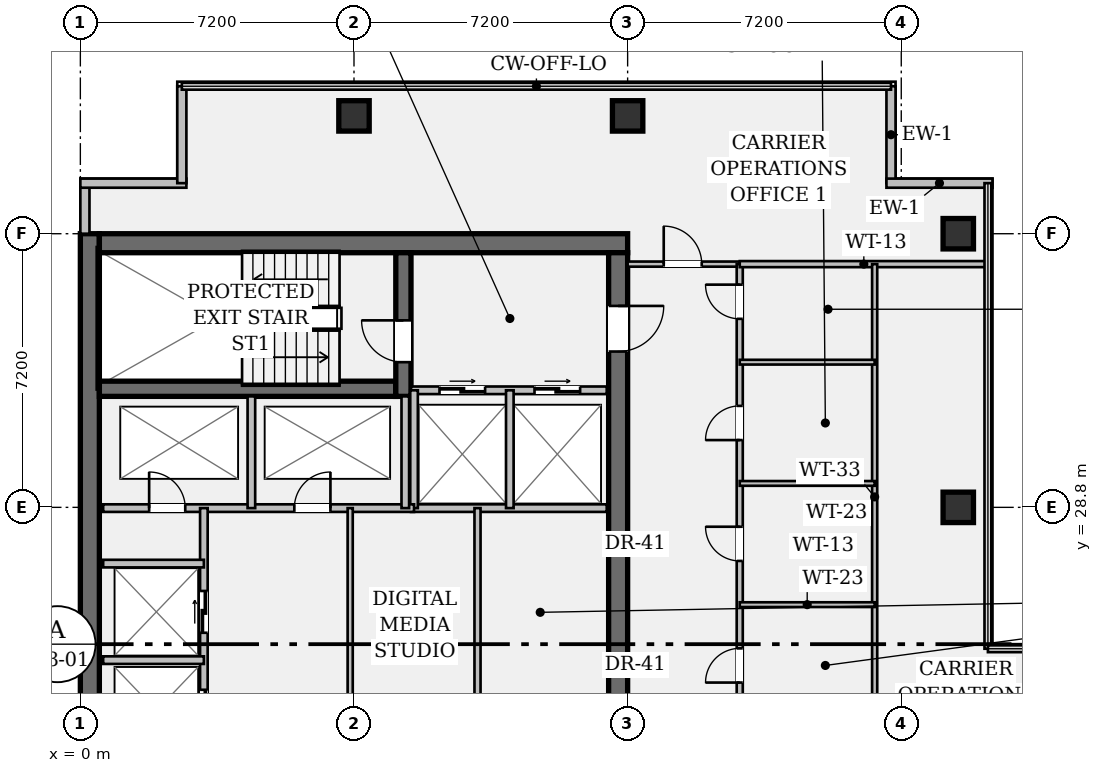
"""IFC4 building model, lengths in metres.
Left out: names, types, materials, properties, quantities, classifications, styles, units other than length and angle.
Written with IfcOpenShell. Run it as: python <this file> out.ifc"""

import sys

from ifc_helpers import new_model, si_unit, direction, frame, frame_2d, origin, origin_2d, place, context, subcontext, project, spatial, rectangle, hollow_rectangle, extrude, element, fill, save


model = new_model("IFC4")
c1 = context("Model", 3, precision=1e-05, world=origin(), true_north=direction((0.0, 1.0)))
c2 = subcontext(c1, "Body", "Model", "MODEL_VIEW")
j1 = project(units=[si_unit("LENGTHUNIT", "METRE"), si_unit("PLANEANGLEUNIT", "RADIAN")], contexts=[c1])
p1 = place(None, origin())
s1 = spatial("IfcSite", under=j1, at=p1, CompositionType="ELEMENT")
p2 = place(p1, origin())
s2 = spatial("IfcBuilding", under=s1, at=p2, CompositionType="ELEMENT")
p3 = place(p2, frame((0.0, 0.0, 194.25)))
s3 = spatial("IfcBuildingStorey", under=s2, at=p3, CompositionType="ELEMENT", Elevation=194.25)
p4 = place(p3, frame((0.25, 7.2, 0.0), z_axis=(0.0, 0.0, 1.0), x_axis=(0.0, 1.0, 0.0)))
e1 = element("IfcWall", 1, at=p4, inside=s3, PredefinedType="SHEAR", context=c2, shape_type="SweptSolid", body=[
    extrude(rectangle(XDim=28.8, YDim=0.5, at=frame_2d((14.4, 0.0))), origin(), (0.0, 0.0, 1.0), 3.24),
])
p5 = place(p3, frame((0.5, 35.75, 0.0), z_axis=(0.0, 0.0, 1.0), x_axis=(1.0, 0.0, 0.0)))
e2 = element("IfcWall", 2, at=p5, inside=s3, PredefinedType="SHEAR", context=c2, shape_type="SweptSolid", body=[
    extrude(rectangle(XDim=13.9, YDim=0.5, at=frame_2d((6.95, 0.0))), origin(), (0.0, 0.0, 1.0), 3.24),
])
p6 = place(p3, frame((14.15, 35.5, 0.0), z_axis=(0.0, 0.0, 1.0), x_axis=(0.0, -1.0, 0.0)))
e3 = element("IfcWall", 3, at=p6, inside=s3, PredefinedType="SHEAR", context=c2, shape_type="SweptSolid", body=[
    extrude(rectangle(XDim=27.8, YDim=0.5, at=frame_2d((13.9, 0.0))), origin(), (0.0, 0.0, 1.0), 3.24),
])
p7 = place(p6, frame((1.4, 0.0, 0.0)))
e4 = element("IfcOpeningElement", 4, at=p7, cuts=e3, PredefinedType="OPENING", context=c2, shape_type="SweptSolid", body=[
    extrude(rectangle(XDim=1.2, YDim=2.15, at=frame_2d((0.6, 1.075))), frame((0.0, 0.262, 0.0), z_axis=(0.0, -1.0, 0.0), x_axis=(1.0, 0.0, 0.0)), (0.0, 0.0, 1.0), 0.524),
])
p8 = place(p6, frame((25.35, 0.0, 0.0)))
e5 = element("IfcOpeningElement", 5, at=p8, cuts=e3, PredefinedType="OPENING", context=c2, shape_type="SweptSolid", body=[
    extrude(rectangle(XDim=1.2, YDim=2.15, at=frame_2d((0.6, 1.075))), frame((0.0, 0.262, 0.0), z_axis=(0.0, -1.0, 0.0), x_axis=(1.0, 0.0, 0.0)), (0.0, 0.0, 1.0), 0.524),
])
p9 = place(p6, frame((14.7, 0.0, 0.0)))
e6 = element("IfcOpeningElement", 6, at=p9, cuts=e3, PredefinedType="OPENING", context=c2, shape_type="SweptSolid", body=[
    extrude(rectangle(XDim=1.6, YDim=2.2, at=frame_2d((0.8, 1.1))), frame((0.0, 0.262, 0.0), z_axis=(0.0, -1.0, 0.0), x_axis=(1.0, 0.0, 0.0)), (0.0, 0.0, 1.0), 0.524),
])
p10 = place(p3, frame((0.5, 31.92, 0.0), z_axis=(0.0, 0.0, 1.0), x_axis=(1.0, 0.0, 0.0)))
e7 = element("IfcWall", 7, at=p10, inside=s3, PredefinedType="SHEAR", context=c2, shape_type="SweptSolid", body=[
    extrude(rectangle(XDim=7.8, YDim=0.4, at=frame_2d((3.9, 0.0))), origin(), (0.0, 0.0, 1.0), 3.24),
])
p11 = place(p3, frame((8.5, 31.72, 0.0), z_axis=(0.0, 0.0, 1.0), x_axis=(0.0, 1.0, 0.0)))
e8 = element("IfcWall", 8, at=p11, inside=s3, PredefinedType="SHEAR", context=c2, shape_type="SweptSolid", body=[
    extrude(rectangle(XDim=3.78, YDim=0.4, at=frame_2d((1.89, 0.0))), origin(), (0.0, 0.0, 1.0), 3.24),
])
p12 = place(p11, frame((0.9, 0.0, 0.0)))
e9 = element("IfcOpeningElement", 9, at=p12, cuts=e8, PredefinedType="OPENING", context=c2, shape_type="SweptSolid", body=[
    extrude(rectangle(XDim=1.1, YDim=2.15, at=frame_2d((0.55, 1.075))), frame((0.0, 0.212, 0.0), z_axis=(0.0, -1.0, 0.0), x_axis=(1.0, 0.0, 0.0)), (0.0, 0.0, 1.0), 0.424),
])
for number, where, z_axis, x_axis in (
    (10, (7.2, 39.1, 0.0), (0.0, 0.0, 1.0), (1.0, 0.0, 0.0)),
    (11, (14.4, 39.1, 0.0), (0.0, 0.0, 1.0), (1.0, 0.0, 0.0)),
    (12, (23.1, 28.8, 0.0), (0.0, 0.0, 1.0), (1.0, 0.0, 0.0)),
    (13, (23.1, 36.0, 0.0), (0.0, 0.0, 1.0), (1.0, 0.0, 0.0)),
):
    element("IfcColumn", number, at=place(p3, frame(where, z_axis=z_axis, x_axis=x_axis)), inside=s3, PredefinedType="COLUMN", context=c2, shape_type="SweptSolid", body=[
        extrude(hollow_rectangle(XDim=0.8, YDim=0.8, WallThickness=0.05, at=origin_2d()), origin(), (0.0, 0.0, 1.0), 3.24),
    ])
p13 = place(p3, frame((0.12, 36.0, 0.0), z_axis=(0.0, 0.0, 1.0), x_axis=(0.0, 1.0, 0.0)))
e14 = element("IfcWall", 14, at=p13, inside=s3, PredefinedType="STANDARD", context=c2, shape_type="SweptSolid", body=[
    extrude(rectangle(XDim=1.33, YDim=0.24, at=frame_2d((0.665, 0.0))), origin(), (0.0, 0.0, 1.0), 3.24),
])
p14 = place(p3, frame((0.0, 37.33, 0.0), z_axis=(0.0, 0.0, 1.0), x_axis=(1.0, 0.0, 0.0)))
e15 = element("IfcWall", 15, at=p14, inside=s3, PredefinedType="STANDARD", context=c2, shape_type="SweptSolid", body=[
    extrude(rectangle(XDim=2.79, YDim=0.24, at=frame_2d((1.395, 0.0))), origin(), (0.0, 0.0, 1.0), 3.24),
])
for number, where, z_axis, x_axis in (
    (16, (2.67, 37.33, 0.0), (0.0, 0.0, 1.0), (0.0, 1.0, 0.0)),
    (17, (21.33, 39.88, 0.0), (0.0, 0.0, 1.0), (0.0, -1.0, 0.0)),
):
    element("IfcWall", number, at=place(p3, frame(where, z_axis=z_axis, x_axis=x_axis)), inside=s3, PredefinedType="STANDARD", context=c2, shape_type="SweptSolid", body=[
        extrude(rectangle(XDim=2.55, YDim=0.24, at=frame_2d((1.275, 0.0))), origin(), (0.0, 0.0, 1.0), 3.24),
    ])
p15 = place(p3, frame((21.21, 37.33, 0.0), z_axis=(0.0, 0.0, 1.0), x_axis=(1.0, 0.0, 0.0)))
e18 = element("IfcWall", 18, at=p15, inside=s3, PredefinedType="STANDARD", context=c2, shape_type="SweptSolid", body=[
    extrude(rectangle(XDim=2.79, YDim=0.24, at=frame_2d((1.395, 0.0))), origin(), (0.0, 0.0, 1.0), 3.24),
])
p16 = place(p3, frame((8.7, 31.88, 0.0), z_axis=(0.0, 0.0, 1.0), x_axis=(1.0, 0.0, 0.0)))
e19 = element("IfcWall", 19, at=p16, inside=s3, PredefinedType="PARTITIONING", context=c2, shape_type="SweptSolid", body=[
    extrude(rectangle(XDim=5.15, YDim=0.2, at=frame_2d((2.575, 0.0))), origin(), (0.0, 0.0, 1.0), 3.24),
])
p17 = place(p16, frame((0.75, 0.0, 0.0)))
e20 = element("IfcOpeningElement", 20, at=p17, cuts=e19, PredefinedType="OPENING", context=c2, shape_type="SweptSolid", body=[
    extrude(rectangle(XDim=1.2, YDim=2.2, at=frame_2d((0.6, 1.1))), frame((0.0, 0.112, 0.0), z_axis=(0.0, -1.0, 0.0), x_axis=(1.0, 0.0, 0.0)), (0.0, 0.0, 1.0), 0.224),
])
p18 = place(p16, frame((3.25, 0.0, 0.0)))
e21 = element("IfcOpeningElement", 21, at=p18, cuts=e19, PredefinedType="OPENING", context=c2, shape_type="SweptSolid", body=[
    extrude(rectangle(XDim=1.2, YDim=2.2, at=frame_2d((0.6, 1.1))), frame((0.0, 0.112, 0.0), z_axis=(0.0, -1.0, 0.0), x_axis=(1.0, 0.0, 0.0)), (0.0, 0.0, 1.0), 0.224),
])
p19 = place(p3, frame((8.7, 28.78, 0.0), z_axis=(0.0, 0.0, 1.0), x_axis=(1.0, 0.0, 0.0)))
e22 = element("IfcWall", 22, at=p19, inside=s3, PredefinedType="PARTITIONING", context=c2, shape_type="SweptSolid", body=[
    extrude(rectangle(XDim=5.15, YDim=0.2, at=frame_2d((2.575, 0.0))), origin(), (0.0, 0.0, 1.0), 3.24),
])
for number, where, z_axis, x_axis in (
    (23, (8.78, 28.78, 0.0), (0.0, 0.0, 1.0), (0.0, 1.0, 0.0)),
    (24, (11.3, 28.78, 0.0), (0.0, 0.0, 1.0), (0.0, 1.0, 0.0)),
):
    element("IfcWall", number, at=place(p3, frame(where, z_axis=z_axis, x_axis=x_axis)), inside=s3, PredefinedType="PARTITIONING", context=c2, shape_type="SweptSolid", body=[
        extrude(rectangle(XDim=3.1, YDim=0.2, at=frame_2d((1.55, 0.0))), origin(), (0.0, 0.0, 1.0), 3.24),
    ])
p20 = place(p3, frame((0.6, 28.78, 0.0), z_axis=(0.0, 0.0, 1.0), x_axis=(1.0, 0.0, 0.0)))
e25 = element("IfcWall", 25, at=p20, inside=s3, PredefinedType="PARTITIONING", context=c2, shape_type="SweptSolid", body=[
    extrude(rectangle(XDim=8.18, YDim=0.2, at=frame_2d((4.09, 0.0))), origin(), (0.0, 0.0, 1.0), 3.24),
])
p21 = place(p20, frame((1.21, 0.0, 0.0)))
e26 = element("IfcOpeningElement", 26, at=p21, cuts=e25, PredefinedType="OPENING", context=c2, shape_type="SweptSolid", body=[
    extrude(rectangle(XDim=0.95, YDim=2.15, at=frame_2d((0.475, 1.075))), frame((0.0, 0.112, 0.0), z_axis=(0.0, -1.0, 0.0), x_axis=(1.0, 0.0, 0.0)), (0.0, 0.0, 1.0), 0.224),
])
p22 = place(p20, frame((5.03, 0.0, 0.0)))
e27 = element("IfcOpeningElement", 27, at=p22, cuts=e25, PredefinedType="OPENING", context=c2, shape_type="SweptSolid", body=[
    extrude(rectangle(XDim=0.95, YDim=2.15, at=frame_2d((0.475, 1.075))), frame((0.0, 0.112, 0.0), z_axis=(0.0, -1.0, 0.0), x_axis=(1.0, 0.0, 0.0)), (0.0, 0.0, 1.0), 0.224),
])
for number, where, z_axis, x_axis in (
    (28, (4.5, 28.78, 0.0), (0.0, 0.0, 1.0), (0.0, 1.0, 0.0)),
    (29, (8.55, 28.78, 0.0), (0.0, 0.0, 1.0), (0.0, 1.0, 0.0)),
):
    element("IfcWall", number, at=place(p3, frame(where, z_axis=z_axis, x_axis=x_axis)), inside=s3, PredefinedType="PARTITIONING", context=c2, shape_type="SweptSolid", body=[
        extrude(rectangle(XDim=2.94, YDim=0.2, at=frame_2d((1.47, 0.0))), origin(), (0.0, 0.0, 1.0), 3.24),
    ])
p23 = place(p3, frame((3.25, 15.7, 0.0), z_axis=(0.0, 0.0, 1.0), x_axis=(0.0, 1.0, 0.0)))
e30 = element("IfcWall", 30, at=p23, inside=s3, PredefinedType="PARTITIONING", context=c2, shape_type="SweptSolid", body=[
    extrude(rectangle(XDim=13.08, YDim=0.2, at=frame_2d((6.54, 0.0))), origin(), (0.0, 0.0, 1.0), 3.24),
])
p24 = place(p23, frame((0.9, 0.0, 0.0)))
e31 = element("IfcOpeningElement", 31, at=p24, cuts=e30, PredefinedType="OPENING", context=c2, shape_type="SweptSolid", body=[
    extrude(rectangle(XDim=1.1, YDim=2.2, at=frame_2d((0.55, 1.1))), frame((0.0, 0.112, 0.0), z_axis=(0.0, -1.0, 0.0), x_axis=(1.0, 0.0, 0.0)), (0.0, 0.0, 1.0), 0.224),
])
p25 = place(p23, frame((3.5, 0.0, 0.0)))
e32 = element("IfcOpeningElement", 32, at=p25, cuts=e30, PredefinedType="OPENING", context=c2, shape_type="SweptSolid", body=[
    extrude(rectangle(XDim=1.1, YDim=2.2, at=frame_2d((0.55, 1.1))), frame((0.0, 0.112, 0.0), z_axis=(0.0, -1.0, 0.0), x_axis=(1.0, 0.0, 0.0)), (0.0, 0.0, 1.0), 0.224),
])
p26 = place(p23, frame((7.2, 0.0, 0.0)))
e33 = element("IfcOpeningElement", 33, at=p26, cuts=e30, PredefinedType="OPENING", context=c2, shape_type="SweptSolid", body=[
    extrude(rectangle(XDim=1.1, YDim=2.2, at=frame_2d((0.55, 1.1))), frame((0.0, 0.112, 0.0), z_axis=(0.0, -1.0, 0.0), x_axis=(1.0, 0.0, 0.0)), (0.0, 0.0, 1.0), 0.224),
])
p27 = place(p23, frame((9.8, 0.0, 0.0)))
e34 = element("IfcOpeningElement", 34, at=p27, cuts=e30, PredefinedType="OPENING", context=c2, shape_type="SweptSolid", body=[
    extrude(rectangle(XDim=1.1, YDim=2.2, at=frame_2d((0.55, 1.1))), frame((0.0, 0.112, 0.0), z_axis=(0.0, -1.0, 0.0), x_axis=(1.0, 0.0, 0.0)), (0.0, 0.0, 1.0), 0.224),
])
for number, where, z_axis, x_axis in (
    (35, (0.6, 24.78, 0.0), (0.0, 0.0, 1.0), (1.0, 0.0, 0.0)),
    (36, (0.6, 27.32, 0.0), (0.0, 0.0, 1.0), (1.0, 0.0, 0.0)),
):
    element("IfcWall", number, at=place(p3, frame(where, z_axis=z_axis, x_axis=x_axis)), inside=s3, PredefinedType="PARTITIONING", context=c2, shape_type="SweptSolid", body=[
        extrude(rectangle(XDim=2.65, YDim=0.2, at=frame_2d((1.325, 0.0))), origin(), (0.0, 0.0, 1.0), 3.24),
    ])
p28 = place(p3, frame((7.1, 22.2, 0.0), z_axis=(0.0, 0.0, 1.0), x_axis=(0.0, 1.0, 0.0)))
e37 = element("IfcWall", 37, at=p28, inside=s3, PredefinedType="PARTITIONING", context=c2, shape_type="SweptSolid", body=[
    extrude(rectangle(XDim=6.58, YDim=0.135, at=frame_2d((3.29, 0.0))), origin(), (0.0, 0.0, 1.0), 3.24),
])
p29 = place(p3, frame((10.45, 22.2, 0.0), z_axis=(0.0, 0.0, 1.0), x_axis=(0.0, 1.0, 0.0)))
e38 = element("IfcWall", 38, at=p29, inside=s3, PredefinedType="PARTITIONING", context=c2, shape_type="SweptSolid", body=[
    extrude(rectangle(XDim=6.58, YDim=0.16, at=frame_2d((3.29, 0.0))), origin(), (0.0, 0.0, 1.0), 3.24),
])
p30 = place(p3, frame((14.4, 35.2, 0.0), z_axis=(0.0, 0.0, 1.0), x_axis=(1.0, 0.0, 0.0)))
e39 = element("IfcWall", 39, at=p30, inside=s3, PredefinedType="PARTITIONING", context=c2, shape_type="SweptSolid", body=[
    extrude(rectangle(XDim=2.95, YDim=0.135, at=frame_2d((1.475, 0.0))), origin(), (0.0, 0.0, 1.0), 2.808),
])
p31 = place(p30, frame((0.95, 0.0, 0.0)))
e40 = element("IfcOpeningElement", 40, at=p31, cuts=e39, PredefinedType="OPENING", context=c2, shape_type="SweptSolid", body=[
    extrude(rectangle(XDim=1.0, YDim=2.15, at=frame_2d((0.5, 1.075))), frame((0.0, 0.08, 0.0), z_axis=(0.0, -1.0, 0.0), x_axis=(1.0, 0.0, 0.0)), (0.0, 0.0, 1.0), 0.159),
])
p32 = place(p3, frame((17.35, 20.35, 0.0), z_axis=(0.0, 0.0, 1.0), x_axis=(0.0, 1.0, 0.0)))
e41 = element("IfcWall", 41, at=p32, inside=s3, PredefinedType="PARTITIONING", context=c2, shape_type="SweptSolid", body=[
    extrude(rectangle(XDim=14.85, YDim=0.16, at=frame_2d((7.425, 0.0))), origin(), (0.0, 0.0, 1.0), 2.603),
])
p33 = place(p32, frame((3.84, 0.0, 0.0)))
e42 = element("IfcOpeningElement", 42, at=p33, cuts=e41, PredefinedType="OPENING", context=c2, shape_type="SweptSolid", body=[
    extrude(rectangle(XDim=0.9, YDim=2.15, at=frame_2d((0.45, 1.075))), frame((0.0, 0.092, 0.0), z_axis=(0.0, -1.0, 0.0), x_axis=(1.0, 0.0, 0.0)), (0.0, 0.0, 1.0), 0.184),
])
p34 = place(p32, frame((7.04, 0.0, 0.0)))
e43 = element("IfcOpeningElement", 43, at=p34, cuts=e41, PredefinedType="OPENING", context=c2, shape_type="SweptSolid", body=[
    extrude(rectangle(XDim=0.9, YDim=2.15, at=frame_2d((0.45, 1.075))), frame((0.0, 0.092, 0.0), z_axis=(0.0, -1.0, 0.0), x_axis=(1.0, 0.0, 0.0)), (0.0, 0.0, 1.0), 0.184),
])
p35 = place(p32, frame((10.22, 0.0, 0.0)))
e44 = element("IfcOpeningElement", 44, at=p35, cuts=e41, PredefinedType="OPENING", context=c2, shape_type="SweptSolid", body=[
    extrude(rectangle(XDim=0.9, YDim=2.15, at=frame_2d((0.45, 1.075))), frame((0.0, 0.092, 0.0), z_axis=(0.0, -1.0, 0.0), x_axis=(1.0, 0.0, 0.0)), (0.0, 0.0, 1.0), 0.184),
])
p36 = place(p32, frame((13.41, 0.0, 0.0)))
e45 = element("IfcOpeningElement", 45, at=p36, cuts=e41, PredefinedType="OPENING", context=c2, shape_type="SweptSolid", body=[
    extrude(rectangle(XDim=0.9, YDim=2.15, at=frame_2d((0.45, 1.075))), frame((0.0, 0.092, 0.0), z_axis=(0.0, -1.0, 0.0), x_axis=(1.0, 0.0, 0.0)), (0.0, 0.0, 1.0), 0.184),
])
p37 = place(p3, frame((17.35, 35.2, 0.0), z_axis=(0.0, 0.0, 1.0), x_axis=(1.0, 0.0, 0.0)))
e46 = element("IfcWall", 46, at=p37, inside=s3, PredefinedType="PARTITIONING", context=c2, shape_type="SweptSolid", body=[
    extrude(rectangle(XDim=6.53, YDim=0.16, at=frame_2d((3.265, 0.0))), origin(), (0.0, 0.0, 1.0), 2.758),
])
p38 = place(p3, frame((20.9, 22.95, 0.0), z_axis=(0.0, 0.0, 1.0), x_axis=(0.0, 1.0, 0.0)))
e47 = element("IfcWall", 47, at=p38, inside=s3, PredefinedType="PARTITIONING", context=c2, shape_type="SweptSolid", body=[
    extrude(rectangle(XDim=12.25, YDim=0.135, at=frame_2d((6.125, 0.0))), origin(), (0.0, 0.0, 1.0), 2.603),
])
for number, where, z_axis, x_axis in (
    (48, (17.35, 26.24, 0.0), (0.0, 0.0, 1.0), (1.0, 0.0, 0.0)),
    (49, (17.35, 29.43, 0.0), (0.0, 0.0, 1.0), (1.0, 0.0, 0.0)),
    (50, (17.35, 32.62, 0.0), (0.0, 0.0, 1.0), (1.0, 0.0, 0.0)),
):
    element("IfcWall", number, at=place(p3, frame(where, z_axis=z_axis, x_axis=x_axis)), inside=s3, PredefinedType="PARTITIONING", context=c2, shape_type="SweptSolid", body=[
        extrude(rectangle(XDim=3.55, YDim=0.125, at=frame_2d((1.775, 0.0))), origin(), (0.0, 0.0, 1.0), 2.808),
    ])
p39 = place(p12, origin())
e51 = element("IfcDoor", 51, at=p39, inside=s3, OperationType="SINGLE_SWING_RIGHT", PredefinedType="DOOR", context=c2, shape_type="SweptSolid", body=[
    extrude(rectangle(XDim=1.1, YDim=2.15, at=frame_2d((0.55, 1.075))), frame((0.0, 0.025, 0.0), z_axis=(0.0, -1.0, 0.0), x_axis=(1.0, 0.0, 0.0)), (0.0, 0.0, 1.0), 0.05),
])
fill(e9, e51)
p40 = place(p7, origin())
e52 = element("IfcDoor", 52, at=p40, inside=s3, OperationType="SINGLE_SWING_LEFT", PredefinedType="DOOR", context=c2, shape_type="SweptSolid", body=[
    extrude(rectangle(XDim=1.2, YDim=2.15, at=frame_2d((0.6, 1.075))), frame((0.0, 0.025, 0.0), z_axis=(0.0, -1.0, 0.0), x_axis=(1.0, 0.0, 0.0)), (0.0, 0.0, 1.0), 0.05),
])
fill(e4, e52)
p41 = place(p17, origin())
e53 = element("IfcDoor", 53, at=p41, inside=s3, OperationType="DOUBLE_DOOR_SLIDING", PredefinedType="DOOR", context=c2, shape_type="SweptSolid", body=[
    extrude(rectangle(XDim=1.2, YDim=2.2, at=frame_2d((0.6, 1.1))), frame((0.0, 0.025, 0.0), z_axis=(0.0, -1.0, 0.0), x_axis=(1.0, 0.0, 0.0)), (0.0, 0.0, 1.0), 0.05),
])
fill(e20, e53)
p42 = place(p18, origin())
e54 = element("IfcDoor", 54, at=p42, inside=s3, OperationType="DOUBLE_DOOR_SLIDING", PredefinedType="DOOR", context=c2, shape_type="SweptSolid", body=[
    extrude(rectangle(XDim=1.2, YDim=2.2, at=frame_2d((0.6, 1.1))), frame((0.0, 0.025, 0.0), z_axis=(0.0, -1.0, 0.0), x_axis=(1.0, 0.0, 0.0)), (0.0, 0.0, 1.0), 0.05),
])
fill(e21, e54)
p43 = place(p21, origin())
e55 = element("IfcDoor", 55, at=p43, inside=s3, OperationType="SINGLE_SWING_LEFT", PredefinedType="DOOR", context=c2, shape_type="SweptSolid", body=[
    extrude(rectangle(XDim=0.95, YDim=2.15, at=frame_2d((0.475, 1.075))), frame((0.0, 0.025, 0.0), z_axis=(0.0, -1.0, 0.0), x_axis=(1.0, 0.0, 0.0)), (0.0, 0.0, 1.0), 0.05),
])
fill(e26, e55)
p44 = place(p22, origin())
e56 = element("IfcDoor", 56, at=p44, inside=s3, OperationType="SINGLE_SWING_RIGHT", PredefinedType="DOOR", context=c2, shape_type="SweptSolid", body=[
    extrude(rectangle(XDim=0.95, YDim=2.15, at=frame_2d((0.475, 1.075))), frame((0.0, 0.025, 0.0), z_axis=(0.0, -1.0, 0.0), x_axis=(1.0, 0.0, 0.0)), (0.0, 0.0, 1.0), 0.05),
])
fill(e27, e56)
p45 = place(p26, origin())
e57 = element("IfcDoor", 57, at=p45, inside=s3, OperationType="DOUBLE_DOOR_SLIDING", PredefinedType="DOOR", context=c2, shape_type="SweptSolid", body=[
    extrude(rectangle(XDim=1.1, YDim=2.2, at=frame_2d((0.55, 1.1))), frame((0.0, 0.025, 0.0), z_axis=(0.0, -1.0, 0.0), x_axis=(1.0, 0.0, 0.0)), (0.0, 0.0, 1.0), 0.05),
])
fill(e33, e57)
p46 = place(p27, origin())
e58 = element("IfcDoor", 58, at=p46, inside=s3, OperationType="DOUBLE_DOOR_SLIDING", PredefinedType="DOOR", context=c2, shape_type="SweptSolid", body=[
    extrude(rectangle(XDim=1.1, YDim=2.2, at=frame_2d((0.55, 1.1))), frame((0.0, 0.025, 0.0), z_axis=(0.0, -1.0, 0.0), x_axis=(1.0, 0.0, 0.0)), (0.0, 0.0, 1.0), 0.05),
])
fill(e34, e58)
p47 = place(p31, origin())
e59 = element("IfcDoor", 59, at=p47, inside=s3, OperationType="SINGLE_SWING_LEFT", PredefinedType="DOOR", context=c2, shape_type="SweptSolid", body=[
    extrude(rectangle(XDim=1.0, YDim=2.15, at=frame_2d((0.5, 1.075))), frame((0.0, 0.025, 0.0), z_axis=(0.0, -1.0, 0.0), x_axis=(1.0, 0.0, 0.0)), (0.0, 0.0, 1.0), 0.05),
])
fill(e40, e59)
p48 = place(p33, origin())
e60 = element("IfcDoor", 60, at=p48, inside=s3, OperationType="SINGLE_SWING_LEFT", PredefinedType="DOOR", context=c2, shape_type="SweptSolid", body=[
    extrude(rectangle(XDim=0.9, YDim=2.15, at=frame_2d((0.45, 1.075))), frame((0.0, 0.025, 0.0), z_axis=(0.0, -1.0, 0.0), x_axis=(1.0, 0.0, 0.0)), (0.0, 0.0, 1.0), 0.05),
])
fill(e42, e60)
p49 = place(p34, origin())
e61 = element("IfcDoor", 61, at=p49, inside=s3, OperationType="SINGLE_SWING_RIGHT", PredefinedType="DOOR", context=c2, shape_type="SweptSolid", body=[
    extrude(rectangle(XDim=0.9, YDim=2.15, at=frame_2d((0.45, 1.075))), frame((0.0, 0.025, 0.0), z_axis=(0.0, -1.0, 0.0), x_axis=(1.0, 0.0, 0.0)), (0.0, 0.0, 1.0), 0.05),
])
fill(e43, e61)
p50 = place(p35, origin())
e62 = element("IfcDoor", 62, at=p50, inside=s3, OperationType="SINGLE_SWING_LEFT", PredefinedType="DOOR", context=c2, shape_type="SweptSolid", body=[
    extrude(rectangle(XDim=0.9, YDim=2.15, at=frame_2d((0.45, 1.075))), frame((0.0, 0.025, 0.0), z_axis=(0.0, -1.0, 0.0), x_axis=(1.0, 0.0, 0.0)), (0.0, 0.0, 1.0), 0.05),
])
fill(e44, e62)
p51 = place(p36, origin())
e63 = element("IfcDoor", 63, at=p51, inside=s3, OperationType="SINGLE_SWING_RIGHT", PredefinedType="DOOR", context=c2, shape_type="SweptSolid", body=[
    extrude(rectangle(XDim=0.9, YDim=2.15, at=frame_2d((0.45, 1.075))), frame((0.0, 0.025, 0.0), z_axis=(0.0, -1.0, 0.0), x_axis=(1.0, 0.0, 0.0)), (0.0, 0.0, 1.0), 0.05),
])
fill(e45, e63)
save(model, sys.argv[1])
